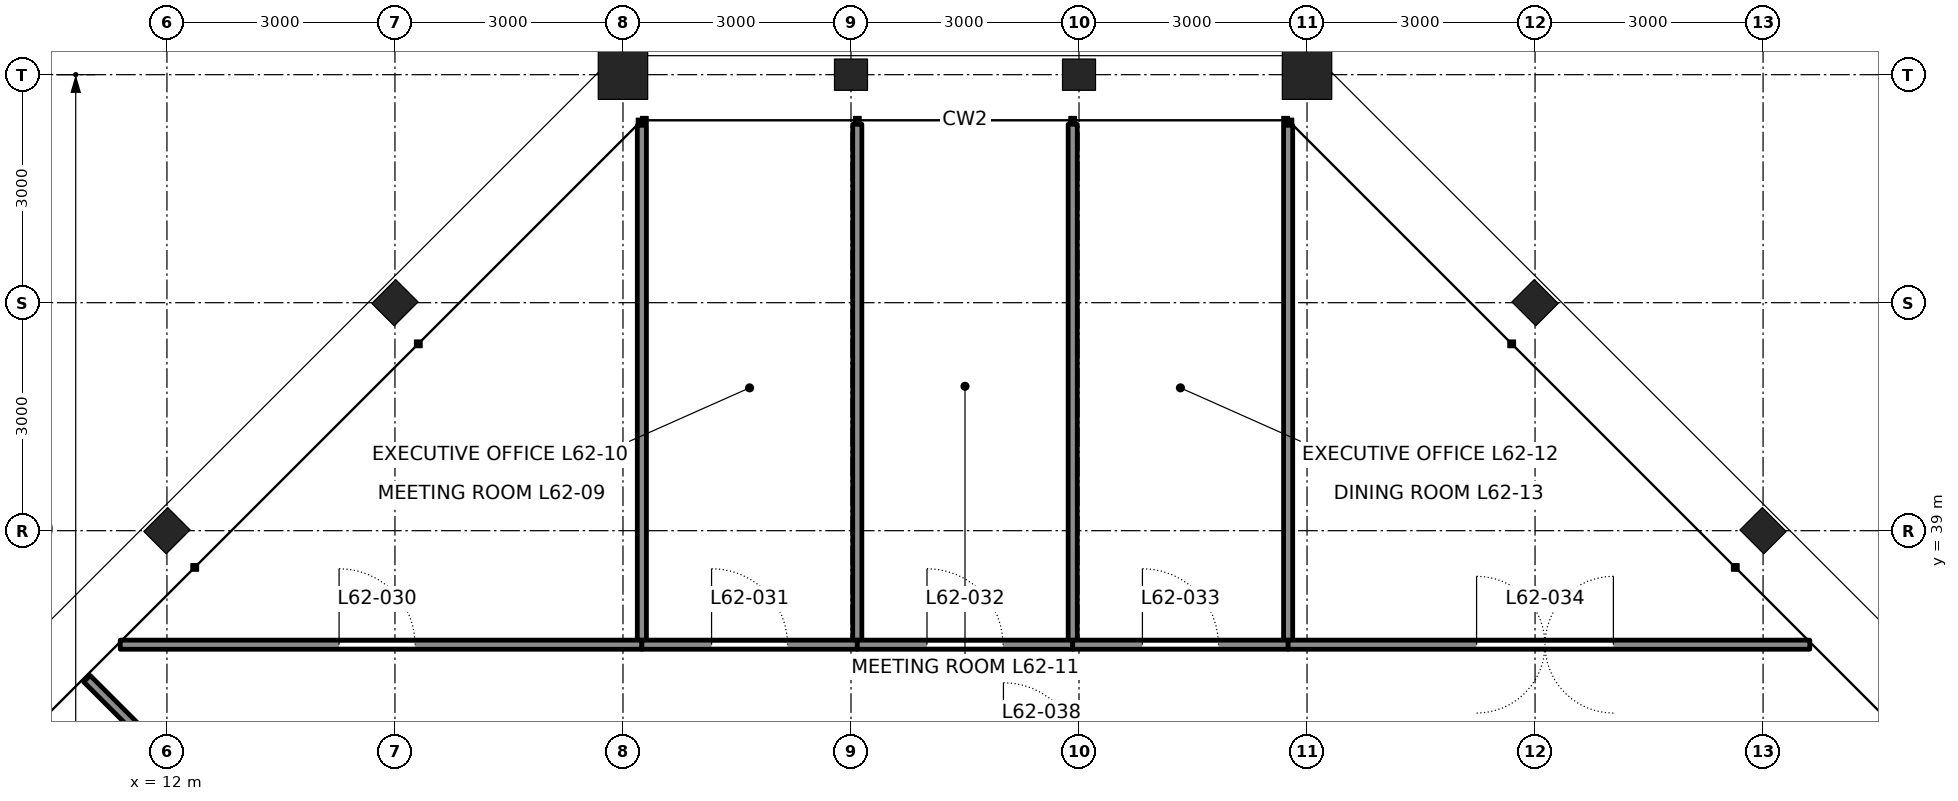
"""IFC4 building model, lengths in metres.
Left out: names, types, materials, properties, quantities, classifications, styles, units other than length and angle.
Written with IfcOpenShell. Run it as: python <this file> out.ifc"""

import sys

from ifc_helpers import new_model, si_unit, direction, frame, frame_2d, origin, origin_2d, place, context, subcontext, project, spatial, rectangle, hollow_rectangle, i_section, extrude, element, fill, save


model = new_model("IFC4")
c1 = context("Model", 3, precision=1e-05, world=origin(), true_north=direction((0.0, 1.0)))
c2 = subcontext(c1, "Body", "Model", "MODEL_VIEW")
j1 = project(units=[si_unit("LENGTHUNIT", "METRE"), si_unit("PLANEANGLEUNIT", "RADIAN")], contexts=[c1])
p1 = place(None, origin())
s1 = spatial("IfcSite", under=j1, at=p1, CompositionType="ELEMENT")
p2 = place(p1, origin())
s2 = spatial("IfcBuilding", under=s1, at=p2, CompositionType="ELEMENT")
p3 = place(p2, frame((0.0, 0.0, 279.0)))
s3 = spatial("IfcBuildingStorey", under=s2, at=p3, CompositionType="ELEMENT", Elevation=279.0)
for number, where, z_axis, x_axis in (
    (1, (33.0, 39.0, 0.0), (0.0, 0.0, 1.0), (0.707, 0.707, 0.0)),
    (2, (30.0, 42.0, 0.0), (0.0, 0.0, 1.0), (0.707, 0.707, 0.0)),
):
    element("IfcColumn", number, at=place(p3, frame(where, z_axis=z_axis, x_axis=x_axis)), inside=s3, PredefinedType="COLUMN", context=c2, shape_type="SweptSolid", body=[
        extrude(i_section(OverallWidth=0.417, OverallDepth=0.445, WebThickness=0.039, FlangeThickness=0.063, at=origin_2d()), origin(), (0.0, 0.0, 1.0), 4.2),
    ])
p4 = place(p3, frame((27.0, 45.0, 0.0), z_axis=(0.0, 0.0, 1.0), x_axis=(0.0, 1.0, 0.0)))
e3 = element("IfcColumn", 3, at=p4, inside=s3, PredefinedType="COLUMN", context=c2, shape_type="SweptSolid", body=[
    extrude(hollow_rectangle(XDim=0.65, YDim=0.65, WallThickness=0.065, at=origin_2d()), origin(), (0.0, 0.0, 1.0), 4.2),
])
for number, where, z_axis, x_axis in (
    (4, (24.0, 45.0, 0.0), (0.0, 0.0, 1.0), (0.0, 1.0, 0.0)),
    (5, (21.0, 45.0, 0.0), (0.0, 0.0, 1.0), (0.0, 1.0, 0.0)),
):
    element("IfcColumn", number, at=place(p3, frame(where, z_axis=z_axis, x_axis=x_axis)), inside=s3, PredefinedType="COLUMN", context=c2, shape_type="SweptSolid", body=[
        extrude(i_section(OverallWidth=0.411, OverallDepth=0.434, WebThickness=0.036, FlangeThickness=0.057, at=origin_2d()), origin(), (0.0, 0.0, 1.0), 4.2),
    ])
p5 = place(p3, frame((18.0, 45.0, 0.0), z_axis=(0.0, 0.0, 1.0), x_axis=(0.0, 1.0, 0.0)))
e6 = element("IfcColumn", 6, at=p5, inside=s3, PredefinedType="COLUMN", context=c2, shape_type="SweptSolid", body=[
    extrude(hollow_rectangle(XDim=0.65, YDim=0.65, WallThickness=0.065, at=origin_2d()), origin(), (0.0, 0.0, 1.0), 4.2),
])
for number, where, z_axis, x_axis in (
    (7, (15.0, 42.0, 0.0), (0.0, 0.0, 1.0), (-0.707, 0.707, 0.0)),
    (8, (12.0, 39.0, 0.0), (0.0, 0.0, 1.0), (-0.707, 0.707, 0.0)),
):
    element("IfcColumn", number, at=place(p3, frame(where, z_axis=z_axis, x_axis=x_axis)), inside=s3, PredefinedType="COLUMN", context=c2, shape_type="SweptSolid", body=[
        extrude(i_section(OverallWidth=0.417, OverallDepth=0.445, WebThickness=0.039, FlangeThickness=0.063, at=origin_2d()), origin(), (0.0, 0.0, 1.0), 4.2),
    ])
p6 = place(p3, frame((18.249, 44.334, 0.0), z_axis=(0.0, 0.0, 1.0), x_axis=(0.0, -1.0, 0.0)))
e9 = element("IfcWall", 9, at=p6, inside=s3, PredefinedType="PARTITIONING", context=c2, shape_type="SweptSolid", body=[
    extrude(rectangle(XDim=6.834, YDim=0.12, at=frame_2d((3.417, 0.0))), origin(), (0.0, 0.0, 1.0), 4.04),
])
for number, where, z_axis, x_axis in (
    (10, (21.083, 44.347, 0.0), (0.0, 0.0, 1.0), (0.0, -1.0, 0.0)),
    (11, (23.917, 44.347, 0.0), (0.0, 0.0, 1.0), (0.0, -1.0, 0.0)),
):
    element("IfcWall", number, at=place(p3, frame(where, z_axis=z_axis, x_axis=x_axis)), inside=s3, PredefinedType="PARTITIONING", context=c2, shape_type="SweptSolid", body=[
        extrude(rectangle(XDim=6.847, YDim=0.12, at=frame_2d((3.424, 0.0))), origin(), (0.0, 0.0, 1.0), 3.357),
    ])
p7 = place(p3, frame((26.751, 44.334, 0.0), z_axis=(0.0, 0.0, 1.0), x_axis=(0.0, -1.0, 0.0)))
e12 = element("IfcWall", 12, at=p7, inside=s3, PredefinedType="PARTITIONING", context=c2, shape_type="SweptSolid", body=[
    extrude(rectangle(XDim=6.834, YDim=0.12, at=frame_2d((3.417, 0.0))), origin(), (0.0, 0.0, 1.0), 4.04),
])
p8 = place(p3, frame((11.385, 37.5, 0.0), z_axis=(0.0, 0.0, 1.0), x_axis=(1.0, 0.0, 0.0)))
e13 = element("IfcWall", 13, at=p8, inside=s3, PredefinedType="PARTITIONING", context=c2, shape_type="SweptSolid", body=[
    extrude(rectangle(XDim=6.863, YDim=0.12, at=frame_2d((3.432, 0.0))), origin(), (0.0, 0.0, 1.0), 4.04),
])
p9 = place(p8, frame((2.879, 0.0, 0.0)))
e14 = element("IfcOpeningElement", 14, at=p9, cuts=e13, PredefinedType="OPENING", context=c2, shape_type="SweptSolid", body=[
    extrude(rectangle(XDim=1.0, YDim=2.4, at=frame_2d((0.5, 1.2))), frame((0.0, 0.07, 0.0), z_axis=(0.0, -1.0, 0.0), x_axis=(1.0, 0.0, 0.0)), (0.0, 0.0, 1.0), 0.14),
])
p10 = place(p3, frame((18.249, 37.5, 0.0), z_axis=(0.0, 0.0, 1.0), x_axis=(1.0, 0.0, 0.0)))
e15 = element("IfcWall", 15, at=p10, inside=s3, PredefinedType="PARTITIONING", context=c2, shape_type="SweptSolid", body=[
    extrude(rectangle(XDim=2.834, YDim=0.12, at=frame_2d((1.417, 0.0))), origin(), (0.0, 0.0, 1.0), 4.04),
])
p11 = place(p10, frame((0.917, 0.0, 0.0)))
e16 = element("IfcOpeningElement", 16, at=p11, cuts=e15, PredefinedType="OPENING", context=c2, shape_type="SweptSolid", body=[
    extrude(rectangle(XDim=1.0, YDim=2.4, at=frame_2d((0.5, 1.2))), frame((0.0, 0.07, 0.0), z_axis=(0.0, -1.0, 0.0), x_axis=(1.0, 0.0, 0.0)), (0.0, 0.0, 1.0), 0.14),
])
p12 = place(p3, frame((21.083, 37.5, 0.0), z_axis=(0.0, 0.0, 1.0), x_axis=(1.0, 0.0, 0.0)))
e17 = element("IfcWall", 17, at=p12, inside=s3, PredefinedType="PARTITIONING", context=c2, shape_type="SweptSolid", body=[
    extrude(rectangle(XDim=2.834, YDim=0.12, at=frame_2d((1.417, 0.0))), origin(), (0.0, 0.0, 1.0), 4.04),
])
p13 = place(p12, frame((0.917, 0.0, 0.0)))
e18 = element("IfcOpeningElement", 18, at=p13, cuts=e17, PredefinedType="OPENING", context=c2, shape_type="SweptSolid", body=[
    extrude(rectangle(XDim=1.0, YDim=2.4, at=frame_2d((0.5, 1.2))), frame((0.0, 0.07, 0.0), z_axis=(0.0, -1.0, 0.0), x_axis=(1.0, 0.0, 0.0)), (0.0, 0.0, 1.0), 0.14),
])
p14 = place(p3, frame((23.917, 37.5, 0.0), z_axis=(0.0, 0.0, 1.0), x_axis=(1.0, 0.0, 0.0)))
e19 = element("IfcWall", 19, at=p14, inside=s3, PredefinedType="PARTITIONING", context=c2, shape_type="SweptSolid", body=[
    extrude(rectangle(XDim=2.834, YDim=0.12, at=frame_2d((1.417, 0.0))), origin(), (0.0, 0.0, 1.0), 4.04),
])
p15 = place(p14, frame((0.917, 0.0, 0.0)))
e20 = element("IfcOpeningElement", 20, at=p15, cuts=e19, PredefinedType="OPENING", context=c2, shape_type="SweptSolid", body=[
    extrude(rectangle(XDim=1.0, YDim=2.4, at=frame_2d((0.5, 1.2))), frame((0.0, 0.07, 0.0), z_axis=(0.0, -1.0, 0.0), x_axis=(1.0, 0.0, 0.0)), (0.0, 0.0, 1.0), 0.14),
])
p16 = place(p3, frame((26.751, 37.5, 0.0), z_axis=(0.0, 0.0, 1.0), x_axis=(1.0, 0.0, 0.0)))
e21 = element("IfcWall", 21, at=p16, inside=s3, PredefinedType="PARTITIONING", context=c2, shape_type="SweptSolid", body=[
    extrude(rectangle(XDim=6.863, YDim=0.12, at=frame_2d((3.432, 0.0))), origin(), (0.0, 0.0, 1.0), 4.04),
])
p17 = place(p16, frame((2.479, 0.0, 0.0)))
e22 = element("IfcOpeningElement", 22, at=p17, cuts=e21, PredefinedType="OPENING", context=c2, shape_type="SweptSolid", body=[
    extrude(rectangle(XDim=1.8, YDim=2.4, at=frame_2d((0.9, 1.2))), frame((0.0, 0.07, 0.0), z_axis=(0.0, -1.0, 0.0), x_axis=(1.0, 0.0, 0.0)), (0.0, 0.0, 1.0), 0.14),
])
p18 = place(p3, frame((12.0, 36.0, 0.0), z_axis=(0.0, 0.0, 1.0), x_axis=(-0.707106781187, 0.707106781187, 0.0)))
e23 = element("IfcWall", 23, at=p18, inside=s3, PredefinedType="PARTITIONING", context=c2, shape_type="SweptSolid", body=[
    extrude(rectangle(XDim=1.489, YDim=0.12, at=frame_2d((0.745, 0.0))), origin(), (0.0, 0.0, 1.0), 4.04),
])
p19 = place(p9, origin())
e24 = element("IfcDoor", 24, at=p19, inside=s3, OperationType="SINGLE_SWING_LEFT", PredefinedType="DOOR", context=c2, shape_type="SweptSolid", body=[
    extrude(rectangle(XDim=1.0, YDim=2.4, at=frame_2d((0.5, 1.2))), frame((0.0, 0.025, 0.0), z_axis=(0.0, -1.0, 0.0), x_axis=(1.0, 0.0, 0.0)), (0.0, 0.0, 1.0), 0.05),
])
fill(e14, e24)
p20 = place(p11, origin())
e25 = element("IfcDoor", 25, at=p20, inside=s3, OperationType="SINGLE_SWING_LEFT", PredefinedType="DOOR", context=c2, shape_type="SweptSolid", body=[
    extrude(rectangle(XDim=1.0, YDim=2.4, at=frame_2d((0.5, 1.2))), frame((0.0, 0.025, 0.0), z_axis=(0.0, -1.0, 0.0), x_axis=(1.0, 0.0, 0.0)), (0.0, 0.0, 1.0), 0.05),
])
fill(e16, e25)
p21 = place(p13, origin())
e26 = element("IfcDoor", 26, at=p21, inside=s3, OperationType="SINGLE_SWING_LEFT", PredefinedType="DOOR", context=c2, shape_type="SweptSolid", body=[
    extrude(rectangle(XDim=1.0, YDim=2.4, at=frame_2d((0.5, 1.2))), frame((0.0, 0.025, 0.0), z_axis=(0.0, -1.0, 0.0), x_axis=(1.0, 0.0, 0.0)), (0.0, 0.0, 1.0), 0.05),
])
fill(e18, e26)
p22 = place(p15, origin())
e27 = element("IfcDoor", 27, at=p22, inside=s3, OperationType="SINGLE_SWING_LEFT", PredefinedType="DOOR", context=c2, shape_type="SweptSolid", body=[
    extrude(rectangle(XDim=1.0, YDim=2.4, at=frame_2d((0.5, 1.2))), frame((0.0, 0.025, 0.0), z_axis=(0.0, -1.0, 0.0), x_axis=(1.0, 0.0, 0.0)), (0.0, 0.0, 1.0), 0.05),
])
fill(e20, e27)
p23 = place(p17, origin())
e28 = element("IfcDoor", 28, at=p23, inside=s3, OperationType="DOUBLE_DOOR_DOUBLE_SWING", PredefinedType="DOOR", context=c2, shape_type="SweptSolid", body=[
    extrude(rectangle(XDim=1.8, YDim=2.4, at=frame_2d((0.9, 1.2))), frame((0.0, 0.025, 0.0), z_axis=(0.0, -1.0, 0.0), x_axis=(1.0, 0.0, 0.0)), (0.0, 0.0, 1.0), 0.05),
])
fill(e22, e28)
save(model, sys.argv[1])
